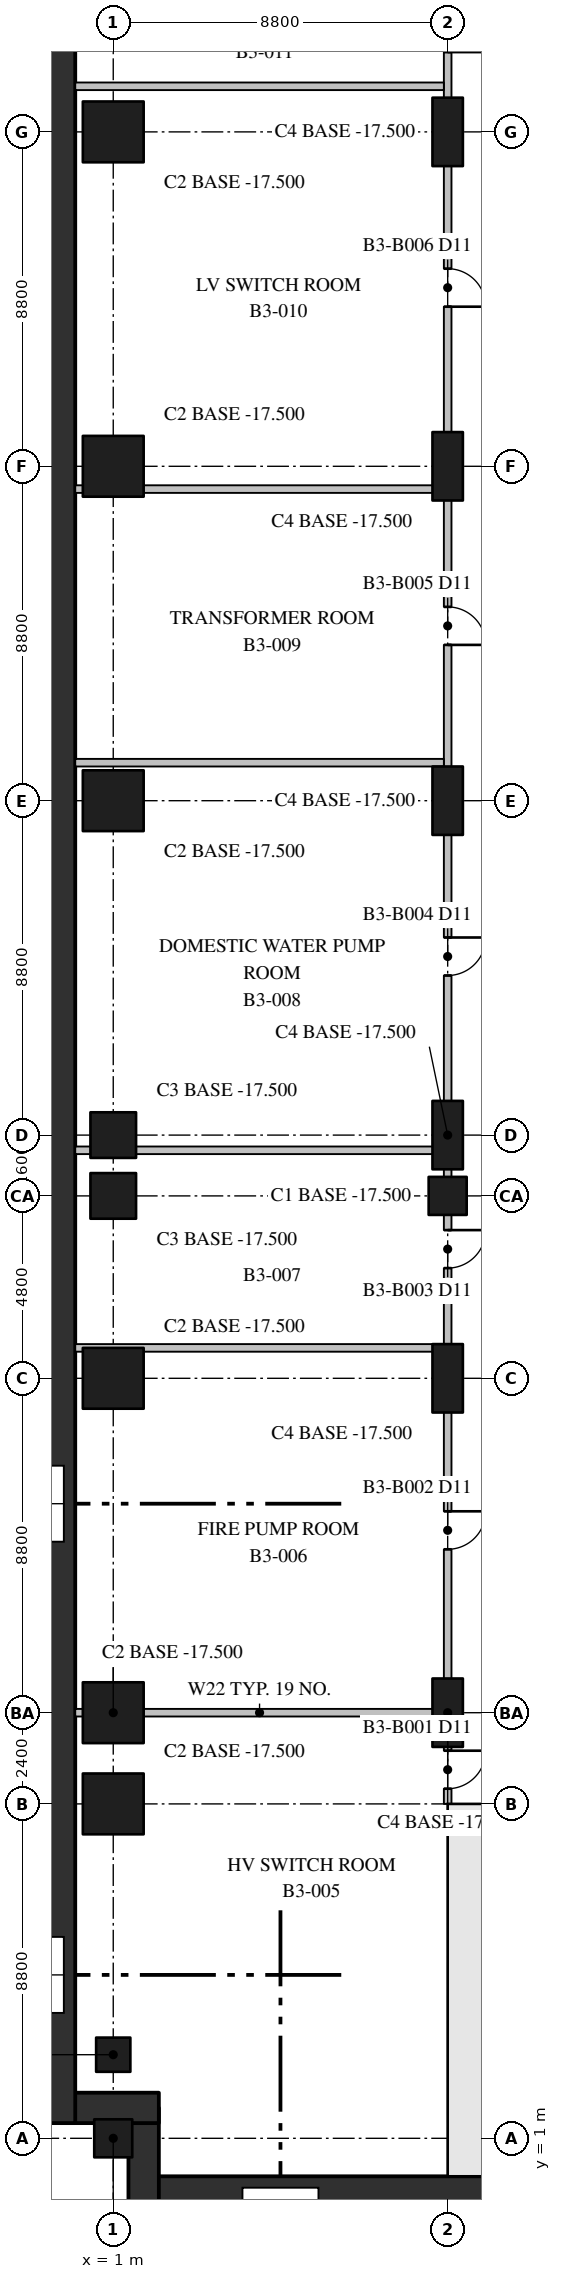
"""IFC4 building model, lengths in metres.
Left out: names, types, materials, properties, quantities, classifications, styles, units other than length and angle.
Written with IfcOpenShell. Run it as: python <this file> out.ifc"""

import sys

from ifc_helpers import new_model, si_unit, direction, frame, frame_2d, origin, origin_2d, place, context, subcontext, project, spatial, rectangle, extrude, element, fill, save


model = new_model("IFC4")
c1 = context("Model", 3, precision=1e-05, world=origin(), true_north=direction((0.0, 1.0)))
c2 = subcontext(c1, "Body", "Model", "MODEL_VIEW")
j1 = project(units=[si_unit("LENGTHUNIT", "METRE"), si_unit("PLANEANGLEUNIT", "RADIAN")], contexts=[c1])
p1 = place(None, origin())
s1 = spatial("IfcSite", under=j1, at=p1, CompositionType="ELEMENT")
p2 = place(p1, origin())
s2 = spatial("IfcBuilding", under=s1, at=p2, CompositionType="ELEMENT")
p3 = place(p2, frame((0.0, 0.0, -17.0)))
s3 = spatial("IfcBuildingStorey", under=s2, at=p3, CompositionType="ELEMENT", Elevation=-17.0)
p4 = place(p3, frame((1.0, 1.0, -0.5), z_axis=(0.0, 0.0, 1.0), x_axis=(1.0, 0.0, 0.0)))
e1 = element("IfcColumn", 1, at=p4, inside=s3, PredefinedType="COLUMN", context=c2, shape_type="SweptSolid", body=[
    extrude(rectangle(XDim=1.0, YDim=1.0, at=origin_2d()), origin(), (0.0, 0.0, 1.0), 5.5),
])
for number, where, z_axis, x_axis in (
    (2, (1.0, 9.8, -0.5), (0.0, 0.0, 1.0), (1.0, 0.0, 0.0)),
    (3, (1.0, 12.2, -0.5), (0.0, 0.0, 1.0), (1.0, 0.0, 0.0)),
    (4, (1.0, 21.0, -0.5), (0.0, 0.0, 1.0), (1.0, 0.0, 0.0)),
):
    element("IfcColumn", number, at=place(p3, frame(where, z_axis=z_axis, x_axis=x_axis)), inside=s3, PredefinedType="COLUMN", context=c2, shape_type="SweptSolid", body=[
        extrude(rectangle(XDim=1.6, YDim=1.6, at=origin_2d()), origin(), (0.0, 0.0, 1.0), 5.5),
    ])
for number, where, z_axis, x_axis in (
    (5, (1.0, 25.8, -0.5), (0.0, 0.0, 1.0), (1.0, 0.0, 0.0)),
    (6, (1.0, 27.4, -0.5), (0.0, 0.0, 1.0), (1.0, 0.0, 0.0)),
):
    element("IfcColumn", number, at=place(p3, frame(where, z_axis=z_axis, x_axis=x_axis)), inside=s3, PredefinedType="COLUMN", context=c2, shape_type="SweptSolid", body=[
        extrude(rectangle(XDim=1.2, YDim=1.2, at=origin_2d()), origin(), (0.0, 0.0, 1.0), 5.5),
    ])
for number, where, z_axis, x_axis in (
    (7, (1.0, 36.2, -0.5), (0.0, 0.0, 1.0), (1.0, 0.0, 0.0)),
    (8, (1.0, 45.0, -0.5), (0.0, 0.0, 1.0), (1.0, 0.0, 0.0)),
    (9, (1.0, 53.8, -0.5), (0.0, 0.0, 1.0), (1.0, 0.0, 0.0)),
):
    element("IfcColumn", number, at=place(p3, frame(where, z_axis=z_axis, x_axis=x_axis)), inside=s3, PredefinedType="COLUMN", context=c2, shape_type="SweptSolid", body=[
        extrude(rectangle(XDim=1.6, YDim=1.6, at=origin_2d()), origin(), (0.0, 0.0, 1.0), 5.5),
    ])
for number, where, z_axis, x_axis in (
    (10, (9.8, 12.2, -0.5), (0.0, 0.0, 1.0), (0.0, 1.0, 0.0)),
    (11, (9.8, 21.0, -0.5), (0.0, 0.0, 1.0), (0.0, 1.0, 0.0)),
):
    element("IfcColumn", number, at=place(p3, frame(where, z_axis=z_axis, x_axis=x_axis)), inside=s3, PredefinedType="COLUMN", context=c2, shape_type="SweptSolid", body=[
        extrude(rectangle(XDim=1.8, YDim=0.8, at=origin_2d()), origin(), (0.0, 0.0, 1.0), 5.5),
    ])
p5 = place(p3, frame((9.8, 25.8, -0.5), z_axis=(0.0, 0.0, 1.0), x_axis=(1.0, 0.0, 0.0)))
e12 = element("IfcColumn", 12, at=p5, inside=s3, PredefinedType="COLUMN", context=c2, shape_type="SweptSolid", body=[
    extrude(rectangle(XDim=1.0, YDim=1.0, at=origin_2d()), origin(), (0.0, 0.0, 1.0), 5.5),
])
for number, where, z_axis, x_axis in (
    (13, (9.8, 27.4, -0.5), (0.0, 0.0, 1.0), (0.0, 1.0, 0.0)),
    (14, (9.8, 36.2, -0.5), (0.0, 0.0, 1.0), (0.0, 1.0, 0.0)),
    (15, (9.8, 45.0, -0.5), (0.0, 0.0, 1.0), (0.0, 1.0, 0.0)),
    (16, (9.8, 53.8, -0.5), (0.0, 0.0, 1.0), (0.0, 1.0, 0.0)),
):
    element("IfcColumn", number, at=place(p3, frame(where, z_axis=z_axis, x_axis=x_axis)), inside=s3, PredefinedType="COLUMN", context=c2, shape_type="SweptSolid", body=[
        extrude(rectangle(XDim=1.8, YDim=0.8, at=origin_2d()), origin(), (0.0, 0.0, 1.0), 5.5),
    ])
p6 = place(p3, frame((1.0, 3.2, -0.5), z_axis=(0.0, 0.0, 1.0), x_axis=(1.0, 0.0, 0.0)))
e17 = element("IfcColumn", 17, at=p6, inside=s3, PredefinedType="COLUMN", context=c2, shape_type="SweptSolid", body=[
    extrude(rectangle(XDim=0.9, YDim=0.9, at=origin_2d()), origin(), (0.0, 0.0, 1.0), 5.5),
])
p7 = place(p3, frame((9.8, 0.6, -0.5), z_axis=(0.0, 0.0, 1.0), x_axis=(1.0, 0.0, 0.0)))
e18 = element("IfcWall", 18, at=p7, inside=s3, PredefinedType="SHEAR", context=c2, shape_type="SweptSolid", body=[
    extrude(rectangle(XDim=35.2, YDim=1.2, at=frame_2d((17.6, 0.0))), origin(), (0.0, 0.0, 1.0), 5.5),
])
p8 = place(p3, frame((10.4, 1.2, -0.5), z_axis=(0.0, 0.0, 1.0), x_axis=(0.0, 1.0, 0.0)))
e19 = element("IfcWall", 19, at=p8, inside=s3, PredefinedType="SHEAR", context=c2, shape_type="SweptSolid", body=[
    extrude(rectangle(XDim=8.6, YDim=1.2, at=frame_2d((4.3, 0.0))), origin(), (0.0, 0.0, 1.0), 5.5),
])
p9 = place(p3, frame((9.8, 9.6, -0.5), z_axis=(0.0, 0.0, 1.0), x_axis=(1.0, 0.0, 0.0)))
e20 = element("IfcWall", 20, at=p9, inside=s3, PredefinedType="SHEAR", context=c2, shape_type="SweptSolid", body=[
    extrude(rectangle(XDim=4.3, YDim=0.4, at=frame_2d((2.15, 0.0))), origin(), (0.0, 0.0, 1.0), 5.5),
])
p10 = place(p9, frame((2.05, 0.0, 0.5)))
e21 = element("IfcOpeningElement", 21, at=p10, cuts=e20, PredefinedType="OPENING", context=c2, shape_type="SweptSolid", body=[
    extrude(rectangle(XDim=1.2, YDim=2.1, at=frame_2d((0.6, 1.05))), frame((0.0, 0.21, 0.0), z_axis=(0.0, -1.0, 0.0), x_axis=(1.0, 0.0, 0.0)), (0.0, 0.0, 1.0), 0.42),
])
p11 = place(p3, frame((79.8, -0.4, -0.5), z_axis=(0.0, 0.0, 1.0), x_axis=(-1.0, 0.0, 0.0)))
e22 = element("IfcWall", 22, at=p11, inside=s3, PredefinedType="SHEAR", context=c2, shape_type="SweptSolid", body=[
    extrude(rectangle(XDim=78.0, YDim=0.8, at=frame_2d((39.0, 0.0))), origin(), (0.0, 0.0, 1.0), 5.5),
])
p12 = place(p3, frame((1.8, -0.8, -0.5), z_axis=(0.0, 0.0, 1.0), x_axis=(0.0, 1.0, 0.0)))
e23 = element("IfcWall", 23, at=p12, inside=s3, PredefinedType="SHEAR", context=c2, shape_type="SweptSolid", body=[
    extrude(rectangle(XDim=2.6, YDim=0.8, at=frame_2d((1.3, 0.0))), origin(), (0.0, 0.0, 1.0), 5.5),
])
p13 = place(p3, frame((2.2, 1.8, -0.5), z_axis=(0.0, 0.0, 1.0), x_axis=(-1.0, 0.0, 0.0)))
e24 = element("IfcWall", 24, at=p13, inside=s3, PredefinedType="SHEAR", context=c2, shape_type="SweptSolid", body=[
    extrude(rectangle(XDim=2.6, YDim=0.8, at=frame_2d((1.3, 0.0))), origin(), (0.0, 0.0, 1.0), 5.5),
])
p14 = place(p3, frame((-0.4, 1.4, -0.5), z_axis=(0.0, 0.0, 1.0), x_axis=(0.0, 1.0, 0.0)))
e25 = element("IfcWall", 25, at=p14, inside=s3, PredefinedType="SHEAR", context=c2, shape_type="SweptSolid", body=[
    extrude(rectangle(XDim=78.0, YDim=0.8, at=frame_2d((39.0, 0.0))), origin(), (0.0, 0.0, 1.0), 5.5),
])
for number, where, z_axis, x_axis in (
    (26, (0.0, 12.2, 0.0), (0.0, 0.0, 1.0), (1.0, 0.0, 0.0)),
    (27, (0.0, 21.8, 0.0), (0.0, 0.0, 1.0), (1.0, 0.0, 0.0)),
    (28, (0.0, 27.0, 0.0), (0.0, 0.0, 1.0), (1.0, 0.0, 0.0)),
    (29, (0.0, 37.2, 0.0), (0.0, 0.0, 1.0), (1.0, 0.0, 0.0)),
    (30, (0.0, 44.4, 0.0), (0.0, 0.0, 1.0), (1.0, 0.0, 0.0)),
    (31, (0.0, 55.0, 0.0), (0.0, 0.0, 1.0), (1.0, 0.0, 0.0)),
):
    element("IfcWall", number, at=place(p3, frame(where, z_axis=z_axis, x_axis=x_axis)), inside=s3, PredefinedType="PARTITIONING", context=c2, shape_type="SweptSolid", body=[
        extrude(rectangle(XDim=9.7, YDim=0.2, at=frame_2d((4.85, 0.0))), origin(), (0.0, 0.0, 1.0), 4.6),
    ])
p15 = place(p3, frame((9.8, 9.8, 0.0), z_axis=(0.0, 0.0, 1.0), x_axis=(0.0, 1.0, 0.0)))
e32 = element("IfcWall", 32, at=p15, inside=s3, PredefinedType="PARTITIONING", context=c2, shape_type="SweptSolid", body=[
    extrude(rectangle(XDim=48.0, YDim=0.2, at=frame_2d((24.0, 0.0))), origin(), (0.0, 0.0, 1.0), 4.6),
])
p16 = place(p15, frame((0.4, 0.0, 0.0)))
e33 = element("IfcOpeningElement", 33, at=p16, cuts=e32, PredefinedType="OPENING", context=c2, shape_type="SweptSolid", body=[
    extrude(rectangle(XDim=1.0, YDim=2.1, at=frame_2d((0.5, 1.05))), frame((0.0, 0.11, 0.0), z_axis=(0.0, -1.0, 0.0), x_axis=(1.0, 0.0, 0.0)), (0.0, 0.0, 1.0), 0.22),
])
p17 = place(p15, frame((6.7, 0.0, 0.0)))
e34 = element("IfcOpeningElement", 34, at=p17, cuts=e32, PredefinedType="OPENING", context=c2, shape_type="SweptSolid", body=[
    extrude(rectangle(XDim=1.0, YDim=2.1, at=frame_2d((0.5, 1.05))), frame((0.0, 0.11, 0.0), z_axis=(0.0, -1.0, 0.0), x_axis=(1.0, 0.0, 0.0)), (0.0, 0.0, 1.0), 0.22),
])
p18 = place(p15, frame((14.1, 0.0, 0.0)))
e35 = element("IfcOpeningElement", 35, at=p18, cuts=e32, PredefinedType="OPENING", context=c2, shape_type="SweptSolid", body=[
    extrude(rectangle(XDim=1.0, YDim=2.1, at=frame_2d((0.5, 1.05))), frame((0.0, 0.11, 0.0), z_axis=(0.0, -1.0, 0.0), x_axis=(1.0, 0.0, 0.0)), (0.0, 0.0, 1.0), 0.22),
])
p19 = place(p15, frame((21.8, 0.0, 0.0)))
e36 = element("IfcOpeningElement", 36, at=p19, cuts=e32, PredefinedType="OPENING", context=c2, shape_type="SweptSolid", body=[
    extrude(rectangle(XDim=1.0, YDim=2.1, at=frame_2d((0.5, 1.05))), frame((0.0, 0.11, 0.0), z_axis=(0.0, -1.0, 0.0), x_axis=(1.0, 0.0, 0.0)), (0.0, 0.0, 1.0), 0.22),
])
p20 = place(p15, frame((30.5, 0.0, 0.0)))
e37 = element("IfcOpeningElement", 37, at=p20, cuts=e32, PredefinedType="OPENING", context=c2, shape_type="SweptSolid", body=[
    extrude(rectangle(XDim=1.0, YDim=2.1, at=frame_2d((0.5, 1.05))), frame((0.0, 0.11, 0.0), z_axis=(0.0, -1.0, 0.0), x_axis=(1.0, 0.0, 0.0)), (0.0, 0.0, 1.0), 0.22),
])
p21 = place(p15, frame((39.4, 0.0, 0.0)))
e38 = element("IfcOpeningElement", 38, at=p21, cuts=e32, PredefinedType="OPENING", context=c2, shape_type="SweptSolid", body=[
    extrude(rectangle(XDim=1.0, YDim=2.1, at=frame_2d((0.5, 1.05))), frame((0.0, 0.11, 0.0), z_axis=(0.0, -1.0, 0.0), x_axis=(1.0, 0.0, 0.0)), (0.0, 0.0, 1.0), 0.22),
])
p22 = place(p15, frame((46.1, 0.0, 0.0)))
e39 = element("IfcOpeningElement", 39, at=p22, cuts=e32, PredefinedType="OPENING", context=c2, shape_type="SweptSolid", body=[
    extrude(rectangle(XDim=1.0, YDim=2.1, at=frame_2d((0.5, 1.05))), frame((0.0, 0.11, 0.0), z_axis=(0.0, -1.0, 0.0), x_axis=(1.0, 0.0, 0.0)), (0.0, 0.0, 1.0), 0.22),
])
p23 = place(p16, frame((1.0, 0.0, 0.0), z_axis=(0.0, 0.0, 1.0), x_axis=(-1.0, 0.0, 0.0)))
e40 = element("IfcDoor", 40, at=p23, inside=s3, OperationType="SINGLE_SWING_RIGHT", PredefinedType="DOOR", context=c2, shape_type="SweptSolid", body=[
    extrude(rectangle(XDim=1.0, YDim=2.1, at=frame_2d((0.5, 1.05))), frame((0.0, 0.025, 0.0), z_axis=(0.0, -1.0, 0.0), x_axis=(1.0, 0.0, 0.0)), (0.0, 0.0, 1.0), 0.05),
])
fill(e33, e40)
p24 = place(p17, frame((1.0, 0.0, 0.0), z_axis=(0.0, 0.0, 1.0), x_axis=(-1.0, 0.0, 0.0)))
e41 = element("IfcDoor", 41, at=p24, inside=s3, OperationType="SINGLE_SWING_RIGHT", PredefinedType="DOOR", context=c2, shape_type="SweptSolid", body=[
    extrude(rectangle(XDim=1.0, YDim=2.1, at=frame_2d((0.5, 1.05))), frame((0.0, 0.025, 0.0), z_axis=(0.0, -1.0, 0.0), x_axis=(1.0, 0.0, 0.0)), (0.0, 0.0, 1.0), 0.05),
])
fill(e34, e41)
p25 = place(p18, frame((1.0, 0.0, 0.0), z_axis=(0.0, 0.0, 1.0), x_axis=(-1.0, 0.0, 0.0)))
e42 = element("IfcDoor", 42, at=p25, inside=s3, OperationType="SINGLE_SWING_RIGHT", PredefinedType="DOOR", context=c2, shape_type="SweptSolid", body=[
    extrude(rectangle(XDim=1.0, YDim=2.1, at=frame_2d((0.5, 1.05))), frame((0.0, 0.025, 0.0), z_axis=(0.0, -1.0, 0.0), x_axis=(1.0, 0.0, 0.0)), (0.0, 0.0, 1.0), 0.05),
])
fill(e35, e42)
p26 = place(p19, frame((1.0, 0.0, 0.0), z_axis=(0.0, 0.0, 1.0), x_axis=(-1.0, 0.0, 0.0)))
e43 = element("IfcDoor", 43, at=p26, inside=s3, OperationType="SINGLE_SWING_RIGHT", PredefinedType="DOOR", context=c2, shape_type="SweptSolid", body=[
    extrude(rectangle(XDim=1.0, YDim=2.1, at=frame_2d((0.5, 1.05))), frame((0.0, 0.025, 0.0), z_axis=(0.0, -1.0, 0.0), x_axis=(1.0, 0.0, 0.0)), (0.0, 0.0, 1.0), 0.05),
])
fill(e36, e43)
p27 = place(p20, frame((1.0, 0.0, 0.0), z_axis=(0.0, 0.0, 1.0), x_axis=(-1.0, 0.0, 0.0)))
e44 = element("IfcDoor", 44, at=p27, inside=s3, OperationType="SINGLE_SWING_LEFT", PredefinedType="DOOR", context=c2, shape_type="SweptSolid", body=[
    extrude(rectangle(XDim=1.0, YDim=2.1, at=frame_2d((0.5, 1.05))), frame((0.0, 0.025, 0.0), z_axis=(0.0, -1.0, 0.0), x_axis=(1.0, 0.0, 0.0)), (0.0, 0.0, 1.0), 0.05),
])
fill(e37, e44)
p28 = place(p21, frame((1.0, 0.0, 0.0), z_axis=(0.0, 0.0, 1.0), x_axis=(-1.0, 0.0, 0.0)))
e45 = element("IfcDoor", 45, at=p28, inside=s3, OperationType="SINGLE_SWING_LEFT", PredefinedType="DOOR", context=c2, shape_type="SweptSolid", body=[
    extrude(rectangle(XDim=1.0, YDim=2.1, at=frame_2d((0.5, 1.05))), frame((0.0, 0.025, 0.0), z_axis=(0.0, -1.0, 0.0), x_axis=(1.0, 0.0, 0.0)), (0.0, 0.0, 1.0), 0.05),
])
fill(e38, e45)
save(model, sys.argv[1])
